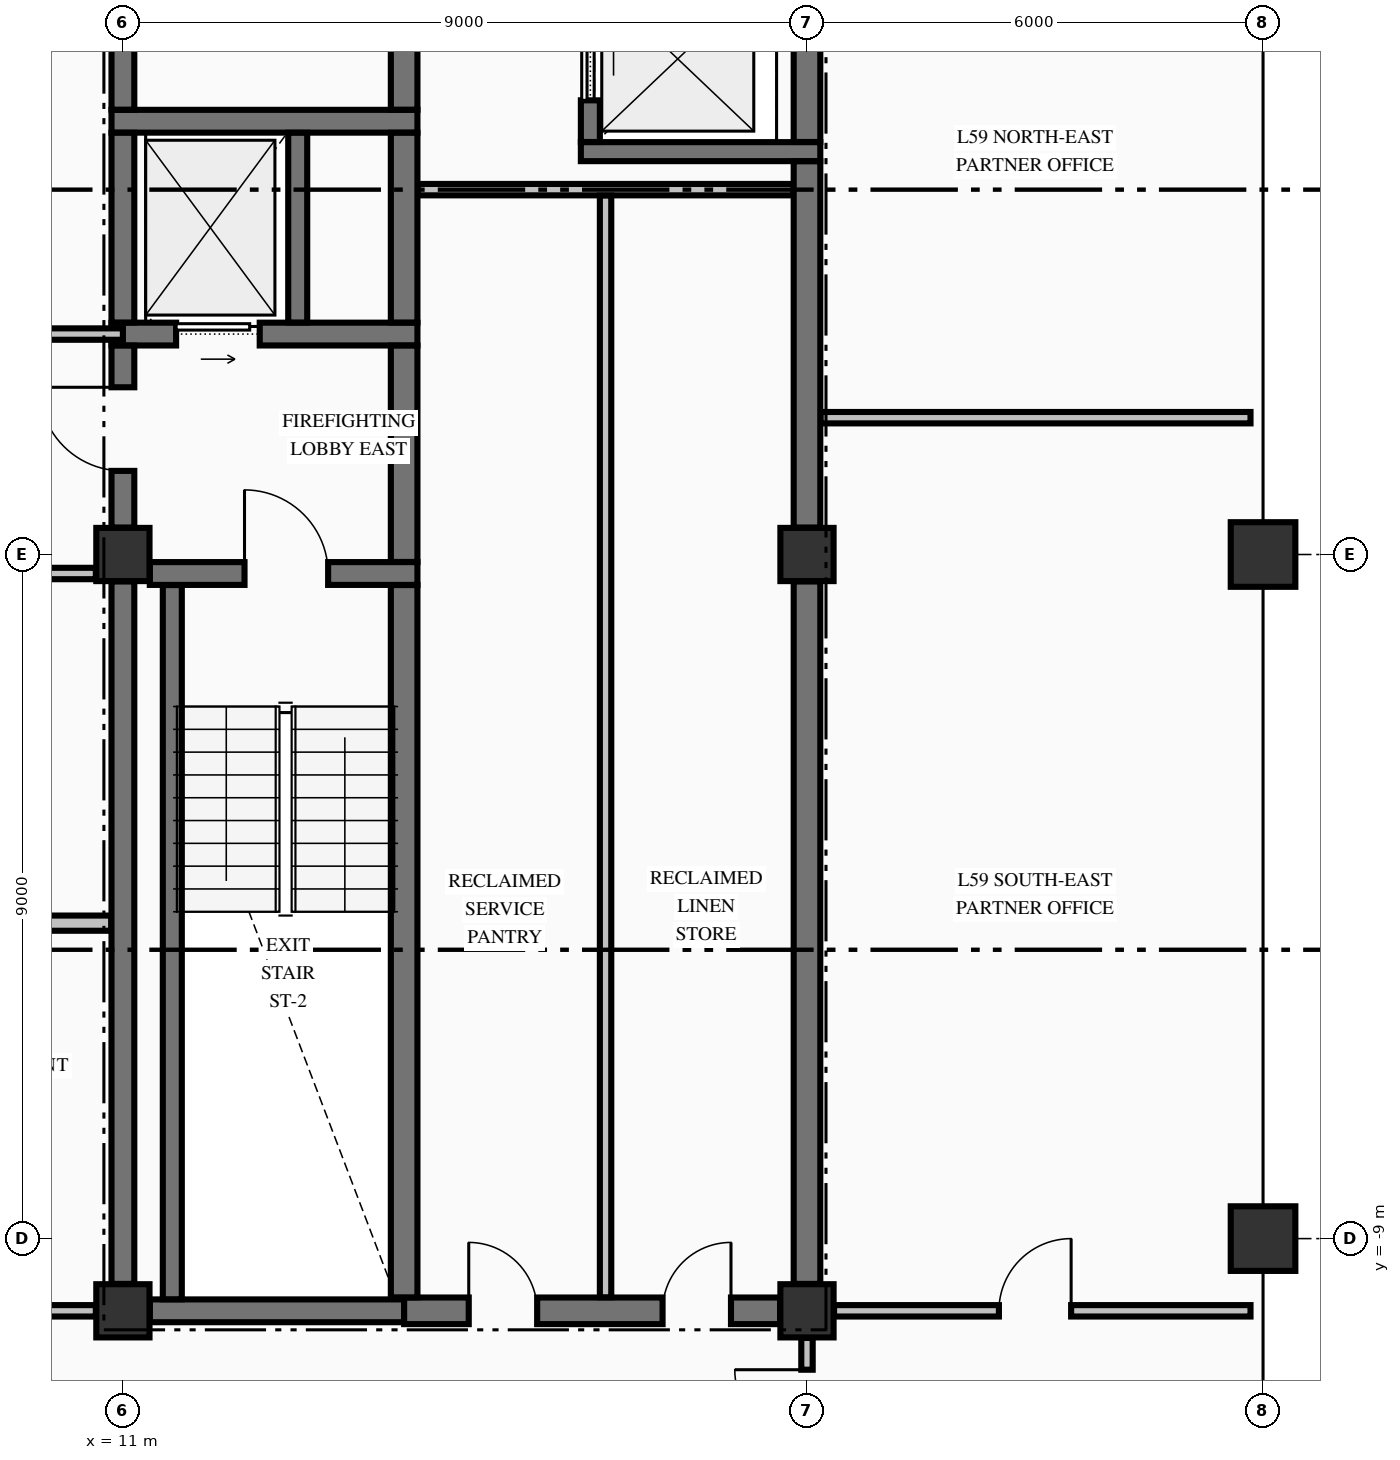
"""IFC4 building model, lengths in metres.
Left out: names, types, materials, properties, quantities, classifications, styles, units other than length and angle.
Written with IfcOpenShell. Run it as: python <this file> out.ifc"""

import sys

from ifc_helpers import new_model, si_unit, direction, frame, frame_2d, origin, origin_2d, place, context, subcontext, project, spatial, rectangle, extrude, element, fill, save


model = new_model("IFC4")
c1 = context("Model", 3, precision=1e-05, world=origin(), true_north=direction((0.0, 1.0)))
c2 = subcontext(c1, "Body", "Model", "MODEL_VIEW")
j1 = project(units=[si_unit("LENGTHUNIT", "METRE"), si_unit("PLANEANGLEUNIT", "RADIAN")], contexts=[c1])
p1 = place(None, origin())
s1 = spatial("IfcSite", under=j1, at=p1, CompositionType="ELEMENT")
p2 = place(p1, origin())
s2 = spatial("IfcBuilding", under=s1, at=p2, CompositionType="ELEMENT")
p3 = place(p2, frame((0.0, 0.0, 226.82)))
s3 = spatial("IfcBuildingStorey", under=s2, at=p3, CompositionType="ELEMENT", Elevation=226.82)
for number, where, z_axis, x_axis in (
    (1, (26.0, -9.0, -0.425), (0.0, 0.0, 1.0), (1.0, 0.0, 0.0)),
    (2, (26.0, 0.0, -0.425), (0.0, 0.0, 1.0), (1.0, 0.0, 0.0)),
):
    element("IfcColumn", number, at=place(p3, frame(where, z_axis=z_axis, x_axis=x_axis)), inside=s3, PredefinedType="COLUMN", context=c2, shape_type="SweptSolid", body=[
        extrude(rectangle(XDim=0.85, YDim=0.85, at=origin_2d()), origin(), (0.0, 0.0, 1.0), 3.405),
    ])
for number, where, z_axis, x_axis in (
    (3, (11.0, -9.95, -0.425), (0.0, 0.0, 1.0), (1.0, 0.0, 0.0)),
    (4, (11.0, 0.0, -0.425), (0.0, 0.0, 1.0), (1.0, 0.0, 0.0)),
    (5, (20.0, -9.95, -0.425), (0.0, 0.0, 1.0), (1.0, 0.0, 0.0)),
    (6, (20.0, 0.0, -0.425), (0.0, 0.0, 1.0), (1.0, 0.0, 0.0)),
):
    element("IfcColumn", number, at=place(p3, frame(where, z_axis=z_axis, x_axis=x_axis)), inside=s3, PredefinedType="COLUMN", context=c2, shape_type="SweptSolid", body=[
        extrude(rectangle(XDim=0.7, YDim=0.7, at=origin_2d()), origin(), (0.0, 0.0, 1.0), 3.405),
    ])
p4 = place(p3, frame((11.354, -9.95, 0.0), z_axis=(0.0, 0.0, 1.0), x_axis=(1.0, 0.0, 0.0)))
e7 = element("IfcWall", 7, at=p4, inside=s3, PredefinedType="SHEAR", context=c2, shape_type="SweptSolid", body=[
    extrude(rectangle(XDim=3.346, YDim=0.3, at=frame_2d((1.673, 0.0))), origin(), (0.0, 0.0, 1.0), 2.98),
])
p5 = place(p3, frame((14.7, -9.95, 0.0), z_axis=(0.0, 0.0, 1.0), x_axis=(1.0, 0.0, 0.0)))
e8 = element("IfcWall", 8, at=p5, inside=s3, PredefinedType="SHEAR", context=c2, shape_type="SweptSolid", body=[
    extrude(rectangle(XDim=4.946, YDim=0.35, at=frame_2d((2.473, 0.0))), origin(), (0.0, 0.0, 1.0), 2.98),
])
p6 = place(p5, frame((0.85, 0.0, 0.0)))
e9 = element("IfcOpeningElement", 9, at=p6, cuts=e8, PredefinedType="OPENING", context=c2, shape_type="SweptSolid", body=[
    extrude(rectangle(XDim=0.9, YDim=2.15, at=frame_2d((0.45, 1.075))), frame((0.0, 0.185, 0.0), z_axis=(0.0, -1.0, 0.0), x_axis=(1.0, 0.0, 0.0)), (0.0, 0.0, 1.0), 0.37),
])
p7 = place(p5, frame((3.4, 0.0, 0.0)))
e10 = element("IfcOpeningElement", 10, at=p7, cuts=e8, PredefinedType="OPENING", context=c2, shape_type="SweptSolid", body=[
    extrude(rectangle(XDim=0.9, YDim=2.15, at=frame_2d((0.45, 1.075))), frame((0.0, 0.185, 0.0), z_axis=(0.0, -1.0, 0.0), x_axis=(1.0, 0.0, 0.0)), (0.0, 0.0, 1.0), 0.37),
])
p8 = place(p3, frame((11.354, -0.25, 0.0), z_axis=(0.0, 0.0, 1.0), x_axis=(1.0, 0.0, 0.0)))
e11 = element("IfcWall", 11, at=p8, inside=s3, PredefinedType="SHEAR", context=c2, shape_type="SweptSolid", body=[
    extrude(rectangle(XDim=3.521, YDim=0.3, at=frame_2d((1.76, 0.0))), origin(), (0.0, 0.0, 1.0), 2.98),
])
p9 = place(p8, frame((1.246, 0.0, 0.0)))
e12 = element("IfcOpeningElement", 12, at=p9, cuts=e11, PredefinedType="OPENING", context=c2, shape_type="SweptSolid", body=[
    extrude(rectangle(XDim=1.1, YDim=2.15, at=frame_2d((0.55, 1.075))), frame((0.0, 0.16, 0.0), z_axis=(0.0, -1.0, 0.0), x_axis=(1.0, 0.0, 0.0)), (0.0, 0.0, 1.0), 0.32),
])
p10 = place(p3, frame((10.85, 2.9, 0.0), z_axis=(0.0, 0.0, 1.0), x_axis=(1.0, 0.0, 0.0)))
e13 = element("IfcWall", 13, at=p10, inside=s3, PredefinedType="SHEAR", context=c2, shape_type="SweptSolid", body=[
    extrude(rectangle(XDim=4.025, YDim=0.3, at=frame_2d((2.012, 0.0))), origin(), (0.0, 0.0, 1.0), 2.98),
])
p11 = place(p10, frame((0.85, 0.0, 0.0)))
e14 = element("IfcOpeningElement", 14, at=p11, cuts=e13, PredefinedType="OPENING", context=c2, shape_type="SweptSolid", body=[
    extrude(rectangle(XDim=1.1, YDim=2.2, at=frame_2d((0.55, 1.1))), frame((0.0, 0.16, 0.0), z_axis=(0.0, -1.0, 0.0), x_axis=(1.0, 0.0, 0.0)), (0.0, 0.0, 1.0), 0.32),
])
p12 = place(p3, frame((17.025, 5.3, 0.0), z_axis=(0.0, 0.0, 1.0), x_axis=(1.0, 0.0, 0.0)))
e15 = element("IfcWall", 15, at=p12, inside=s3, PredefinedType="SOLIDWALL", context=c2, shape_type="SweptSolid", body=[
    extrude(rectangle(XDim=3.15, YDim=0.25, at=frame_2d((1.575, 0.0))), origin(), (0.0, 0.0, 1.0), 2.98),
])
p13 = place(p3, frame((10.85, 5.7, 0.0), z_axis=(0.0, 0.0, 1.0), x_axis=(1.0, 0.0, 0.0)))
e16 = element("IfcWall", 16, at=p13, inside=s3, PredefinedType="SHEAR", context=c2, shape_type="SweptSolid", body=[
    extrude(rectangle(XDim=4.025, YDim=0.3, at=frame_2d((2.012, 0.0))), origin(), (0.0, 0.0, 1.0), 2.98),
])
p14 = place(p3, frame((-10.644, -9.95, 0.0), z_axis=(0.0, 0.0, 1.0), x_axis=(1.0, 0.0, 0.0)))
e17 = element("IfcWall", 17, at=p14, inside=s3, PredefinedType="PARTITIONING", context=c2, shape_type="SweptSolid", body=[
    extrude(rectangle(XDim=21.288, YDim=0.15, at=frame_2d((10.644, 0.0))), origin(), (0.0, 0.0, 1.0), 2.98),
])
p15 = place(p14, frame((14.294, 0.0, 0.0)))
e18 = element("IfcOpeningElement", 18, at=p15, cuts=e17, PredefinedType="OPENING", context=c2, shape_type="SweptSolid", body=[
    extrude(rectangle(XDim=1.1, YDim=2.15, at=frame_2d((0.55, 1.075))), frame((0.0, 0.085, 0.0), z_axis=(0.0, -1.0, 0.0), x_axis=(1.0, 0.0, 0.0)), (0.0, 0.0, 1.0), 0.17),
])
p16 = place(p14, frame((19.719, 0.0, 0.0)))
e19 = element("IfcOpeningElement", 19, at=p16, cuts=e17, PredefinedType="OPENING", context=c2, shape_type="SweptSolid", body=[
    extrude(rectangle(XDim=0.95, YDim=2.15, at=frame_2d((0.475, 1.075))), frame((0.0, 0.085, 0.0), z_axis=(0.0, -1.0, 0.0), x_axis=(1.0, 0.0, 0.0)), (0.0, 0.0, 1.0), 0.17),
])
p17 = place(p3, frame((20.356, -9.95, 0.0), z_axis=(0.0, 0.0, 1.0), x_axis=(1.0, 0.0, 0.0)))
e20 = element("IfcWall", 20, at=p17, inside=s3, PredefinedType="PARTITIONING", context=c2, shape_type="SweptSolid", body=[
    extrude(rectangle(XDim=5.479, YDim=0.15, at=frame_2d((2.74, 0.0))), origin(), (0.0, 0.0, 1.0), 2.98),
])
p18 = place(p17, frame((2.169, 0.0, 0.0)))
e21 = element("IfcOpeningElement", 21, at=p18, cuts=e20, PredefinedType="OPENING", context=c2, shape_type="SweptSolid", body=[
    extrude(rectangle(XDim=0.95, YDim=2.15, at=frame_2d((0.475, 1.075))), frame((0.0, 0.085, 0.0), z_axis=(0.0, -1.0, 0.0), x_axis=(1.0, 0.0, 0.0)), (0.0, 0.0, 1.0), 0.17),
])
p19 = place(p3, frame((5.225, -4.85, 0.0), z_axis=(0.0, 0.0, 1.0), x_axis=(1.0, 0.0, 0.0)))
e22 = element("IfcWall", 22, at=p19, inside=s3, PredefinedType="PARTITIONING", context=c2, shape_type="SweptSolid", body=[
    extrude(rectangle(XDim=5.622, YDim=0.2, at=frame_2d((2.811, 0.0))), origin(), (0.0, 0.0, 1.0), 2.98),
])
p20 = place(p3, frame((-10.644, -0.25, 0.0), z_axis=(0.0, 0.0, 1.0), x_axis=(1.0, 0.0, 0.0)))
e23 = element("IfcWall", 23, at=p20, inside=s3, PredefinedType="PARTITIONING", context=c2, shape_type="SweptSolid", body=[
    extrude(rectangle(XDim=21.288, YDim=0.15, at=frame_2d((10.644, 0.0))), origin(), (0.0, 0.0, 1.0), 2.98),
])
p21 = place(p20, frame((14.294, 0.0, 0.0)))
e24 = element("IfcOpeningElement", 24, at=p21, cuts=e23, PredefinedType="OPENING", context=c2, shape_type="SweptSolid", body=[
    extrude(rectangle(XDim=1.1, YDim=2.15, at=frame_2d((0.55, 1.075))), frame((0.0, 0.085, 0.0), z_axis=(0.0, -1.0, 0.0), x_axis=(1.0, 0.0, 0.0)), (0.0, 0.0, 1.0), 0.17),
])
p22 = place(p20, frame((6.169, 0.0, 0.0)))
e25 = element("IfcOpeningElement", 25, at=p22, cuts=e23, PredefinedType="OPENING", context=c2, shape_type="SweptSolid", body=[
    extrude(rectangle(XDim=1.05, YDim=2.15, at=frame_2d((0.525, 1.075))), frame((0.0, 0.085, 0.0), z_axis=(0.0, -1.0, 0.0), x_axis=(1.0, 0.0, 0.0)), (0.0, 0.0, 1.0), 0.17),
])
p23 = place(p20, frame((18.319, 0.0, 0.0)))
e26 = element("IfcOpeningElement", 26, at=p23, cuts=e23, PredefinedType="OPENING", context=c2, shape_type="SweptSolid", body=[
    extrude(rectangle(XDim=0.95, YDim=2.15, at=frame_2d((0.475, 1.075))), frame((0.0, 0.085, 0.0), z_axis=(0.0, -1.0, 0.0), x_axis=(1.0, 0.0, 0.0)), (0.0, 0.0, 1.0), 0.17),
])
p24 = place(p3, frame((20.178, 1.8, 0.0), z_axis=(0.0, 0.0, 1.0), x_axis=(1.0, 0.0, 0.0)))
e27 = element("IfcWall", 27, at=p24, inside=s3, PredefinedType="PARTITIONING", context=c2, shape_type="SweptSolid", body=[
    extrude(rectangle(XDim=5.657, YDim=0.15, at=frame_2d((2.829, 0.0))), origin(), (0.0, 0.0, 1.0), 2.98),
])
p25 = place(p3, frame((-11.0, 2.9, 0.0), z_axis=(0.0, 0.0, 1.0), x_axis=(1.0, 0.0, 0.0)))
e28 = element("IfcWall", 28, at=p25, inside=s3, PredefinedType="PARTITIONING", context=c2, shape_type="SweptSolid", body=[
    extrude(rectangle(XDim=22.0, YDim=0.15, at=frame_2d((11.0, 0.0))), origin(), (0.0, 0.0, 1.0), 2.98),
])
p26 = place(p25, frame((14.65, 0.0, 0.0)))
e29 = element("IfcOpeningElement", 29, at=p26, cuts=e28, PredefinedType="OPENING", context=c2, shape_type="SweptSolid", body=[
    extrude(rectangle(XDim=1.1, YDim=2.15, at=frame_2d((0.55, 1.075))), frame((0.0, 0.085, 0.0), z_axis=(0.0, -1.0, 0.0), x_axis=(1.0, 0.0, 0.0)), (0.0, 0.0, 1.0), 0.17),
])
p27 = place(p25, frame((6.525, 0.0, 0.0)))
e30 = element("IfcOpeningElement", 30, at=p27, cuts=e28, PredefinedType="OPENING", context=c2, shape_type="SweptSolid", body=[
    extrude(rectangle(XDim=1.05, YDim=2.15, at=frame_2d((0.525, 1.075))), frame((0.0, 0.085, 0.0), z_axis=(0.0, -1.0, 0.0), x_axis=(1.0, 0.0, 0.0)), (0.0, 0.0, 1.0), 0.17),
])
p28 = place(p25, frame((18.6, 0.0, 0.0)))
e31 = element("IfcOpeningElement", 31, at=p28, cuts=e28, PredefinedType="OPENING", context=c2, shape_type="SweptSolid", body=[
    extrude(rectangle(XDim=1.1, YDim=2.15, at=frame_2d((0.55, 1.075))), frame((0.0, 0.085, 0.0), z_axis=(0.0, -1.0, 0.0), x_axis=(1.0, 0.0, 0.0)), (0.0, 0.0, 1.0), 0.17),
])
p29 = place(p3, frame((14.878, 4.8, 0.0), z_axis=(0.0, 0.0, 1.0), x_axis=(1.0, 0.0, 0.0)))
e32 = element("IfcWall", 32, at=p29, inside=s3, PredefinedType="PARTITIONING", context=c2, shape_type="SweptSolid", body=[
    extrude(rectangle(XDim=4.944, YDim=0.15, at=frame_2d((2.472, 0.0))), origin(), (0.0, 0.0, 1.0), 2.98),
])
p30 = place(p3, frame((11.0, -9.596, 0.0), z_axis=(0.0, 0.0, 1.0), x_axis=(0.0, 1.0, 0.0)))
e33 = element("IfcWall", 33, at=p30, inside=s3, PredefinedType="SHEAR", context=c2, shape_type="SweptSolid", body=[
    extrude(rectangle(XDim=9.242, YDim=0.3, at=frame_2d((4.621, 0.0))), origin(), (0.0, 0.0, 1.0), 2.98),
])
p31 = place(p3, frame((11.0, 0.354, 0.0), z_axis=(0.0, 0.0, 1.0), x_axis=(0.0, 1.0, 0.0)))
e34 = element("IfcWall", 34, at=p31, inside=s3, PredefinedType="SHEAR", context=c2, shape_type="SweptSolid", body=[
    extrude(rectangle(XDim=2.394, YDim=0.3, at=frame_2d((1.197, 0.0))), origin(), (0.0, 0.0, 1.0), 2.98),
])
p32 = place(p31, frame((0.746, 0.0, 0.0)))
e35 = element("IfcOpeningElement", 35, at=p32, cuts=e34, PredefinedType="OPENING", context=c2, shape_type="SweptSolid", body=[
    extrude(rectangle(XDim=1.1, YDim=2.15, at=frame_2d((0.55, 1.075))), frame((0.0, 0.16, 0.0), z_axis=(0.0, -1.0, 0.0), x_axis=(1.0, 0.0, 0.0)), (0.0, 0.0, 1.0), 0.32),
])
p33 = place(p3, frame((11.0, 3.052, 0.0), z_axis=(0.0, 0.0, 1.0), x_axis=(0.0, 1.0, 0.0)))
e36 = element("IfcWall", 36, at=p33, inside=s3, PredefinedType="SHEAR", context=c2, shape_type="SweptSolid", body=[
    extrude(rectangle(XDim=2.496, YDim=0.3, at=frame_2d((1.248, 0.0))), origin(), (0.0, 0.0, 1.0), 2.98),
])
p34 = place(p3, frame((11.0, 5.852, 0.0), z_axis=(0.0, 0.0, 1.0), x_axis=(0.0, 1.0, 0.0)))
e37 = element("IfcWall", 37, at=p34, inside=s3, PredefinedType="SHEAR", context=c2, shape_type="SweptSolid", body=[
    extrude(rectangle(XDim=4.294, YDim=0.3, at=frame_2d((2.147, 0.0))), origin(), (0.0, 0.0, 1.0), 2.98),
])
p35 = place(p3, frame((11.65, -9.798, 0.0), z_axis=(0.0, 0.0, 1.0), x_axis=(0.0, 1.0, 0.0)))
e38 = element("IfcWall", 38, at=p35, inside=s3, PredefinedType="SOLIDWALL", context=c2, shape_type="SweptSolid", body=[
    extrude(rectangle(XDim=9.396, YDim=0.25, at=frame_2d((4.698, 0.0))), origin(), (0.0, 0.0, 1.0), 2.98),
])
p36 = place(p3, frame((13.3, 3.052, 0.0), z_axis=(0.0, 0.0, 1.0), x_axis=(0.0, 1.0, 0.0)))
e39 = element("IfcWall", 39, at=p36, inside=s3, PredefinedType="SOLIDWALL", context=c2, shape_type="SweptSolid", body=[
    extrude(rectangle(XDim=2.496, YDim=0.25, at=frame_2d((1.248, 0.0))), origin(), (0.0, 0.0, 1.0), 2.98),
])
p37 = place(p3, frame((14.7, -9.773, 0.0), z_axis=(0.0, 0.0, 1.0), x_axis=(0.0, 1.0, 0.0)))
e40 = element("IfcWall", 40, at=p37, inside=s3, PredefinedType="SHEAR", context=c2, shape_type="SweptSolid", body=[
    extrude(rectangle(XDim=9.371, YDim=0.35, at=frame_2d((4.686, 0.0))), origin(), (0.0, 0.0, 1.0), 2.98),
])
p38 = place(p3, frame((14.7, -0.098, 0.0), z_axis=(0.0, 0.0, 1.0), x_axis=(0.0, 1.0, 0.0)))
e41 = element("IfcWall", 41, at=p38, inside=s3, PredefinedType="SHEAR", context=c2, shape_type="SweptSolid", body=[
    extrude(rectangle(XDim=2.846, YDim=0.35, at=frame_2d((1.423, 0.0))), origin(), (0.0, 0.0, 1.0), 2.98),
])
p39 = place(p3, frame((14.7, 3.052, 0.0), z_axis=(0.0, 0.0, 1.0), x_axis=(0.0, 1.0, 0.0)))
e42 = element("IfcWall", 42, at=p39, inside=s3, PredefinedType="SHEAR", context=c2, shape_type="SweptSolid", body=[
    extrude(rectangle(XDim=2.496, YDim=0.35, at=frame_2d((1.248, 0.0))), origin(), (0.0, 0.0, 1.0), 2.98),
])
p40 = place(p3, frame((14.7, 5.852, 0.0), z_axis=(0.0, 0.0, 1.0), x_axis=(0.0, 1.0, 0.0)))
e43 = element("IfcWall", 43, at=p40, inside=s3, PredefinedType="SHEAR", context=c2, shape_type="SweptSolid", body=[
    extrude(rectangle(XDim=4.471, YDim=0.35, at=frame_2d((2.235, 0.0))), origin(), (0.0, 0.0, 1.0), 2.98),
])
p41 = place(p3, frame((17.15, 5.427, 0.0), z_axis=(0.0, 0.0, 1.0), x_axis=(0.0, 1.0, 0.0)))
e44 = element("IfcWall", 44, at=p41, inside=s3, PredefinedType="SOLIDWALL", context=c2, shape_type="SweptSolid", body=[
    extrude(rectangle(XDim=2.196, YDim=0.25, at=frame_2d((1.098, 0.0))), origin(), (0.0, 0.0, 1.0), 2.98),
])
p42 = place(p41, frame((0.548, 0.0, 0.0)))
e45 = element("IfcOpeningElement", 45, at=p42, cuts=e44, PredefinedType="OPENING", context=c2, shape_type="SweptSolid", body=[
    extrude(rectangle(XDim=1.1, YDim=2.2, at=frame_2d((0.55, 1.1))), frame((0.0, 0.135, 0.0), z_axis=(0.0, -1.0, 0.0), x_axis=(1.0, 0.0, 0.0)), (0.0, 0.0, 1.0), 0.27),
])
p43 = place(p3, frame((20.0, -9.596, 0.0), z_axis=(0.0, 0.0, 1.0), x_axis=(0.0, 1.0, 0.0)))
e46 = element("IfcWall", 46, at=p43, inside=s3, PredefinedType="SHEAR", context=c2, shape_type="SweptSolid", body=[
    extrude(rectangle(XDim=9.242, YDim=0.35, at=frame_2d((4.621, 0.0))), origin(), (0.0, 0.0, 1.0), 2.98),
])
p44 = place(p3, frame((20.0, 0.354, 0.0), z_axis=(0.0, 0.0, 1.0), x_axis=(0.0, 1.0, 0.0)))
e47 = element("IfcWall", 47, at=p44, inside=s3, PredefinedType="SHEAR", context=c2, shape_type="SweptSolid", body=[
    extrude(rectangle(XDim=4.819, YDim=0.35, at=frame_2d((2.41, 0.0))), origin(), (0.0, 0.0, 1.0), 2.98),
])
p45 = place(p3, frame((20.0, 5.427, 0.0), z_axis=(0.0, 0.0, 1.0), x_axis=(0.0, 1.0, 0.0)))
e48 = element("IfcWall", 48, at=p45, inside=s3, PredefinedType="SHEAR", context=c2, shape_type="SweptSolid", body=[
    extrude(rectangle(XDim=2.196, YDim=0.35, at=frame_2d((1.098, 0.0))), origin(), (0.0, 0.0, 1.0), 2.98),
])
p46 = place(p3, frame((17.35, -9.772, 0.0), z_axis=(0.0, 0.0, 1.0), x_axis=(0.0, 1.0, 0.0)))
e49 = element("IfcWall", 49, at=p46, inside=s3, PredefinedType="PARTITIONING", context=c2, shape_type="SweptSolid", body=[
    extrude(rectangle(XDim=14.494, YDim=0.15, at=frame_2d((7.247, 0.0))), origin(), (0.0, 0.0, 1.0), 2.98),
])
p47 = place(p3, frame((20.0, -12.372, 0.0), z_axis=(0.0, 0.0, 1.0), x_axis=(0.0, 1.0, 0.0)))
e50 = element("IfcWall", 50, at=p47, inside=s3, PredefinedType="PARTITIONING", context=c2, shape_type="SweptSolid", body=[
    extrude(rectangle(XDim=2.066, YDim=0.15, at=frame_2d((1.033, 0.0))), origin(), (0.0, 0.0, 1.0), 2.98),
])
p48 = place(p47, frame((0.697, 0.0, 0.0)))
e51 = element("IfcOpeningElement", 51, at=p48, cuts=e50, PredefinedType="OPENING", context=c2, shape_type="SweptSolid", body=[
    extrude(rectangle(XDim=0.95, YDim=2.15, at=frame_2d((0.475, 1.075))), frame((0.0, 0.085, 0.0), z_axis=(0.0, -1.0, 0.0), x_axis=(1.0, 0.0, 0.0)), (0.0, 0.0, 1.0), 0.17),
])
p49 = place(p9, origin())
e52 = element("IfcDoor", 52, at=p49, inside=s3, OperationType="SINGLE_SWING_LEFT", PredefinedType="DOOR", context=c2, shape_type="SweptSolid", body=[
    extrude(rectangle(XDim=1.1, YDim=2.15, at=frame_2d((0.55, 1.075))), frame((0.0, 0.025, 0.0), z_axis=(0.0, -1.0, 0.0), x_axis=(1.0, 0.0, 0.0)), (0.0, 0.0, 1.0), 0.05),
])
fill(e12, e52)
p50 = place(p32, origin())
e53 = element("IfcDoor", 53, at=p50, inside=s3, OperationType="SINGLE_SWING_RIGHT", PredefinedType="DOOR", context=c2, shape_type="SweptSolid", body=[
    extrude(rectangle(XDim=1.1, YDim=2.15, at=frame_2d((0.55, 1.075))), frame((0.0, 0.025, 0.0), z_axis=(0.0, -1.0, 0.0), x_axis=(1.0, 0.0, 0.0)), (0.0, 0.0, 1.0), 0.05),
])
fill(e35, e53)
p51 = place(p11, origin())
e54 = element("IfcDoor", 54, at=p51, inside=s3, OperationType="SLIDING_TO_RIGHT", PredefinedType="DOOR", context=c2, shape_type="SweptSolid", body=[
    extrude(rectangle(XDim=1.1, YDim=2.2, at=frame_2d((0.55, 1.1))), frame((0.0, 0.025, 0.0), z_axis=(0.0, -1.0, 0.0), x_axis=(1.0, 0.0, 0.0)), (0.0, 0.0, 1.0), 0.05),
])
fill(e14, e54)
p52 = place(p42, origin())
e55 = element("IfcDoor", 55, at=p52, inside=s3, OperationType="SLIDING_TO_RIGHT", PredefinedType="DOOR", context=c2, shape_type="SweptSolid", body=[
    extrude(rectangle(XDim=1.1, YDim=2.2, at=frame_2d((0.55, 1.1))), frame((0.0, 0.025, 0.0), z_axis=(0.0, -1.0, 0.0), x_axis=(1.0, 0.0, 0.0)), (0.0, 0.0, 1.0), 0.05),
])
fill(e45, e55)
p53 = place(p6, origin())
e56 = element("IfcDoor", 56, at=p53, inside=s3, OperationType="SINGLE_SWING_LEFT", PredefinedType="DOOR", context=c2, shape_type="SweptSolid", body=[
    extrude(rectangle(XDim=0.9, YDim=2.15, at=frame_2d((0.45, 1.075))), frame((0.0, 0.025, 0.0), z_axis=(0.0, -1.0, 0.0), x_axis=(1.0, 0.0, 0.0)), (0.0, 0.0, 1.0), 0.05),
])
fill(e9, e56)
p54 = place(p7, origin())
e57 = element("IfcDoor", 57, at=p54, inside=s3, OperationType="SINGLE_SWING_RIGHT", PredefinedType="DOOR", context=c2, shape_type="SweptSolid", body=[
    extrude(rectangle(XDim=0.9, YDim=2.15, at=frame_2d((0.45, 1.075))), frame((0.0, 0.025, 0.0), z_axis=(0.0, -1.0, 0.0), x_axis=(1.0, 0.0, 0.0)), (0.0, 0.0, 1.0), 0.05),
])
fill(e10, e57)
p55 = place(p48, origin())
e58 = element("IfcDoor", 58, at=p55, inside=s3, OperationType="SINGLE_SWING_RIGHT", PredefinedType="DOOR", context=c2, shape_type="SweptSolid", body=[
    extrude(rectangle(XDim=0.95, YDim=2.15, at=frame_2d((0.475, 1.075))), frame((0.0, 0.025, 0.0), z_axis=(0.0, -1.0, 0.0), x_axis=(1.0, 0.0, 0.0)), (0.0, 0.0, 1.0), 0.05),
])
fill(e51, e58)
p56 = place(p18, origin())
e59 = element("IfcDoor", 59, at=p56, inside=s3, OperationType="SINGLE_SWING_RIGHT", PredefinedType="DOOR", context=c2, shape_type="SweptSolid", body=[
    extrude(rectangle(XDim=0.95, YDim=2.15, at=frame_2d((0.475, 1.075))), frame((0.0, 0.025, 0.0), z_axis=(0.0, -1.0, 0.0), x_axis=(1.0, 0.0, 0.0)), (0.0, 0.0, 1.0), 0.05),
])
fill(e21, e59)
save(model, sys.argv[1])
